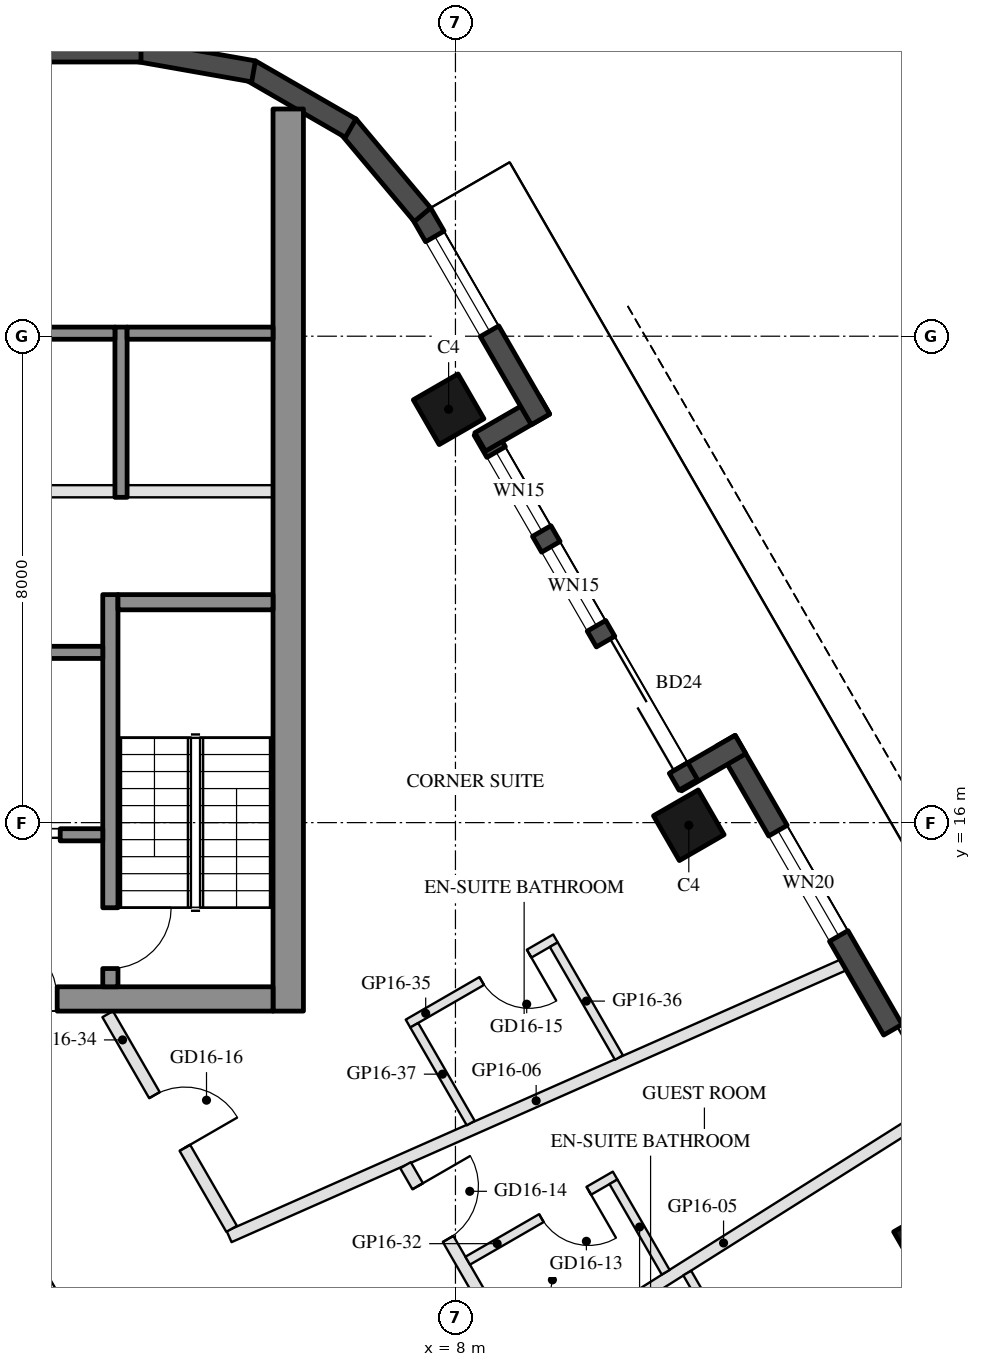
"""IFC4 building model, lengths in metres.
Left out: names, types, materials, properties, quantities, classifications, styles, units other than length and angle.
Written with IfcOpenShell. Run it as: python <this file> out.ifc"""

import sys

from ifc_helpers import new_model, si_unit, direction, frame, frame_2d, origin, origin_2d, place, context, subcontext, project, spatial, rectangle, hollow_rectangle, extrude, element, fill, save


model = new_model("IFC4")
c1 = context("Model", 3, precision=1e-05, world=origin(), true_north=direction((0.0, 1.0)))
c2 = subcontext(c1, "Body", "Model", "MODEL_VIEW")
j1 = project(units=[si_unit("LENGTHUNIT", "METRE"), si_unit("PLANEANGLEUNIT", "RADIAN")], contexts=[c1])
p1 = place(None, origin())
s1 = spatial("IfcSite", under=j1, at=p1, CompositionType="ELEMENT")
p2 = place(p1, origin())
s2 = spatial("IfcBuilding", under=s1, at=p2, CompositionType="ELEMENT")
p3 = place(p2, frame((0.0, 0.0, 179.9)))
s3 = spatial("IfcBuildingStorey", under=s2, at=p3, CompositionType="ELEMENT", Elevation=179.9)
for number, where, z_axis, x_axis in (
    (1, (15.788, 9.115, 0.0), (0.0, 0.0, 1.0), (-0.5, 0.866, 0.0)),
    (2, (11.838, 15.957, 0.0), (0.0, 0.0, 1.0), (-0.5, 0.866, 0.0)),
    (3, (7.888, 22.798, 0.0), (0.0, 0.0, 1.0), (-0.5, 0.866, 0.0)),
):
    element("IfcColumn", number, at=place(p3, frame(where, z_axis=z_axis, x_axis=x_axis)), inside=s3, PredefinedType="COLUMN", context=c2, shape_type="SweptSolid", body=[
        extrude(hollow_rectangle(XDim=0.85, YDim=0.85, WallThickness=0.04, at=origin_2d()), origin(), (0.0, 0.0, 1.0), 3.7),
    ])
p4 = place(p3, frame((17.299, 8.948, 0.0), z_axis=(0.0, 0.0, 1.0), x_axis=(-0.500010041276, 0.866019606374, 0.0)))
e4 = element("IfcWall", 4, at=p4, inside=s3, PredefinedType="SOLIDWALL", context=c2, shape_type="SweptSolid", body=[
    extrude(rectangle(XDim=9.7, YDim=0.35, at=frame_2d((4.85, 0.0))), origin(), (0.0, 0.0, 1.0), 3.55),
])
p5 = place(p4, frame((3.21, 0.0, 0.0)))
e5 = element("IfcOpeningElement", 5, at=p5, cuts=e4, PredefinedType="OPENING", context=c2, shape_type="SweptSolid", body=[
    extrude(rectangle(XDim=1.0, YDim=2.4, at=frame_2d((0.5, 1.2))), frame((0.0, 0.185, 0.0), z_axis=(0.0, -1.0, 0.0), x_axis=(1.0, 0.0, 0.0)), (0.0, 0.0, 1.0), 0.37),
])
p6 = place(p4, frame((5.99, 0.0, 0.3)))
e6 = element("IfcOpeningElement", 6, at=p6, cuts=e4, PredefinedType="OPENING", context=c2, shape_type="SweptSolid", body=[
    extrude(rectangle(XDim=2.0, YDim=2.65, at=frame_2d((1.0, 1.325))), frame((0.0, 0.185, 0.0), z_axis=(0.0, -1.0, 0.0), x_axis=(1.0, 0.0, 0.0)), (0.0, 0.0, 1.0), 0.37),
])
p7 = place(p3, frame((12.688, 17.284, 0.0), z_axis=(0.0, 0.0, 1.0), x_axis=(-0.865955602162, -0.500120880472, 0.0)))
e7 = element("IfcWall", 7, at=p7, inside=s3, PredefinedType="SOLIDWALL", context=c2, shape_type="SweptSolid", body=[
    extrude(rectangle(XDim=1.22, YDim=0.35, at=frame_2d((0.61, 0.0))), origin(), (0.0, 0.0, 1.0), 3.55),
])
p8 = place(p3, frame((11.829, 16.621, 0.0), z_axis=(0.0, 0.0, 1.0), x_axis=(-0.500003597184, 0.866023326939, 0.0)))
e8 = element("IfcWall", 8, at=p8, inside=s3, PredefinedType="SOLIDWALL", context=c2, shape_type="SweptSolid", body=[
    extrude(rectangle(XDim=6.74, YDim=0.35, at=frame_2d((3.37, 0.0))), origin(), (0.0, 0.0, 1.0), 3.55),
])
p9 = place(p8, frame((0.32, 0.0, 0.0)))
e9 = element("IfcOpeningElement", 9, at=p9, cuts=e8, PredefinedType="OPENING", context=c2, shape_type="SweptSolid", body=[
    extrude(rectangle(XDim=2.4, YDim=2.4, at=frame_2d((1.2, 1.2))), frame((0.0, 0.185, 0.0), z_axis=(0.0, -1.0, 0.0), x_axis=(1.0, 0.0, 0.0)), (0.0, 0.0, 1.0), 0.37),
])
p10 = place(p8, frame((3.02, 0.0, 0.3)))
e10 = element("IfcOpeningElement", 10, at=p10, cuts=e8, PredefinedType="OPENING", context=c2, shape_type="SweptSolid", body=[
    extrude(rectangle(XDim=1.5, YDim=2.65, at=frame_2d((0.75, 1.325))), frame((0.0, 0.185, 0.0), z_axis=(0.0, -1.0, 0.0), x_axis=(1.0, 0.0, 0.0)), (0.0, 0.0, 1.0), 0.37),
])
p11 = place(p8, frame((4.82, 0.0, 0.3)))
e11 = element("IfcOpeningElement", 11, at=p11, cuts=e8, PredefinedType="OPENING", context=c2, shape_type="SweptSolid", body=[
    extrude(rectangle(XDim=1.5, YDim=2.65, at=frame_2d((0.75, 1.325))), frame((0.0, 0.185, 0.0), z_axis=(0.0, -1.0, 0.0), x_axis=(1.0, 0.0, 0.0)), (0.0, 0.0, 1.0), 0.37),
])
p12 = place(p3, frame((8.406, 22.26, 0.0), z_axis=(0.0, 0.0, 1.0), x_axis=(0.865955602162, 0.500120880472, 0.0)))
e12 = element("IfcWall", 12, at=p12, inside=s3, PredefinedType="SOLIDWALL", context=c2, shape_type="SweptSolid", body=[
    extrude(rectangle(XDim=1.22, YDim=0.35, at=frame_2d((0.61, 0.0))), origin(), (0.0, 0.0, 1.0), 3.55),
])
p13 = place(p3, frame((9.398, 22.631, 0.0), z_axis=(0.0, 0.0, 1.0), x_axis=(-0.499954521343, 0.866051659307, 0.0)))
e13 = element("IfcWall", 13, at=p13, inside=s3, PredefinedType="SOLIDWALL", context=c2, shape_type="SweptSolid", body=[
    extrude(rectangle(XDim=3.916, YDim=0.35, at=frame_2d((1.958, 0.0))), origin(), (0.0, 0.0, 1.0), 3.55),
])
p14 = place(p13, frame((1.675, 0.0, 0.3)))
e14 = element("IfcOpeningElement", 14, at=p14, cuts=e13, PredefinedType="OPENING", context=c2, shape_type="SweptSolid", body=[
    extrude(rectangle(XDim=1.8, YDim=2.65, at=frame_2d((0.9, 1.325))), frame((0.0, 0.185, 0.0), z_axis=(0.0, -1.0, 0.0), x_axis=(1.0, 0.0, 0.0)), (0.0, 0.0, 1.0), 0.37),
])
p15 = place(p3, frame((7.458, 25.998, 0.0), z_axis=(0.0, 0.0, 1.0), x_axis=(-0.642808304945, 0.766027077259, 0.0)))
e15 = element("IfcWall", 15, at=p15, inside=s3, PredefinedType="SOLIDWALL", context=c2, shape_type="SweptSolid", body=[
    extrude(rectangle(XDim=1.91, YDim=0.35, at=frame_2d((0.955, 0.0))), origin(), (0.0, 0.0, 1.0), 3.55),
])
for number, where, z_axis, x_axis in (
    (16, (6.277, 27.422, 0.0), (0.0, 0.0, 1.0), (-0.866, 0.5, 0.0)),
    (17, (4.68, 28.356, 0.0), (0.0, 0.0, 1.0), (-0.985, 0.174, 0.0)),
):
    element("IfcWall", number, at=place(p3, frame(where, z_axis=z_axis, x_axis=x_axis)), inside=s3, PredefinedType="SOLIDWALL", context=c2, shape_type="SweptSolid", body=[
        extrude(rectangle(XDim=1.91, YDim=0.35, at=frame_2d((0.955, 0.0))), origin(), (0.0, 0.0, 1.0), 3.55),
    ])
p16 = place(p3, frame((2.829, 28.685, 0.0), z_axis=(0.0, 0.0, 1.0), x_axis=(-1.0, 0.0, 0.0)))
e18 = element("IfcWall", 18, at=p16, inside=s3, PredefinedType="SOLIDWALL", context=c2, shape_type="SweptSolid", body=[
    extrude(rectangle(XDim=5.658, YDim=0.35, at=frame_2d((2.829, 0.0))), origin(), (0.0, 0.0, 1.0), 3.55),
])
p17 = place(p3, frame((5.25, 12.9, 0.0), z_axis=(0.0, 0.0, 1.0), x_axis=(0.0, 1.0, 0.0)))
e19 = element("IfcWall", 19, at=p17, inside=s3, PredefinedType="SHEAR", context=c2, shape_type="SweptSolid", body=[
    extrude(rectangle(XDim=14.837, YDim=0.5, at=frame_2d((7.418, 0.0))), origin(), (0.0, 0.0, 1.0), 3.5),
])
p18 = place(p3, frame((5.0, 13.1, 0.0), z_axis=(0.0, 0.0, 1.0), x_axis=(-1.0, 0.0, 0.0)))
e20 = element("IfcWall", 20, at=p18, inside=s3, PredefinedType="SHEAR", context=c2, shape_type="SweptSolid", body=[
    extrude(rectangle(XDim=10.0, YDim=0.4, at=frame_2d((5.0, 0.0))), origin(), (0.0, 0.0, 1.0), 3.5),
])
p19 = place(p18, frame((3.55, 0.0, 0.0)))
e21 = element("IfcOpeningElement", 21, at=p19, cuts=e20, PredefinedType="OPENING", context=c2, shape_type="SweptSolid", body=[
    extrude(rectangle(XDim=1.1, YDim=2.1, at=frame_2d((0.55, 1.05))), frame((0.0, 0.21, 0.0), z_axis=(0.0, -1.0, 0.0), x_axis=(1.0, 0.0, 0.0)), (0.0, 0.0, 1.0), 0.42),
])
p20 = place(p18, frame((5.85, 0.0, 0.0)))
e22 = element("IfcOpeningElement", 22, at=p20, cuts=e20, PredefinedType="OPENING", context=c2, shape_type="SweptSolid", body=[
    extrude(rectangle(XDim=1.4, YDim=2.1, at=frame_2d((0.7, 1.05))), frame((0.0, 0.21, 0.0), z_axis=(0.0, -1.0, 0.0), x_axis=(1.0, 0.0, 0.0)), (0.0, 0.0, 1.0), 0.42),
])
p21 = place(p3, frame((2.325, 13.3, 0.0), z_axis=(0.0, 0.0, 1.0), x_axis=(0.0, 1.0, 0.0)))
e23 = element("IfcWall", 23, at=p21, inside=s3, PredefinedType="SHEAR", context=c2, shape_type="SweptSolid", body=[
    extrude(rectangle(XDim=6.45, YDim=0.25, at=frame_2d((3.225, 0.0))), origin(), (0.0, 0.0, 1.0), 3.5),
])
p22 = place(p21, frame((0.3, 0.0, 0.0)))
e24 = element("IfcOpeningElement", 24, at=p22, cuts=e23, PredefinedType="OPENING", context=c2, shape_type="SweptSolid", body=[
    extrude(rectangle(XDim=1.0, YDim=2.1, at=frame_2d((0.5, 1.05))), frame((0.0, 0.135, 0.0), z_axis=(0.0, -1.0, 0.0), x_axis=(1.0, 0.0, 0.0)), (0.0, 0.0, 1.0), 0.27),
])
p23 = place(p3, frame((5.0, 19.625, 0.0), z_axis=(0.0, 0.0, 1.0), x_axis=(-1.0, 0.0, 0.0)))
e25 = element("IfcWall", 25, at=p23, inside=s3, PredefinedType="SHEAR", context=c2, shape_type="SweptSolid", body=[
    extrude(rectangle(XDim=2.55, YDim=0.25, at=frame_2d((1.275, 0.0))), origin(), (0.0, 0.0, 1.0), 3.5),
])
p24 = place(p3, frame((2.2, 18.8, 0.0), z_axis=(0.0, 0.0, 1.0), x_axis=(-1.0, 0.0, 0.0)))
e26 = element("IfcWall", 26, at=p24, inside=s3, PredefinedType="SHEAR", context=c2, shape_type="SweptSolid", body=[
    extrude(rectangle(XDim=2.8, YDim=0.2, at=frame_2d((1.4, 0.0))), origin(), (0.0, 0.0, 1.0), 3.5),
])
p25 = place(p3, frame((2.2, 15.8, 0.0), z_axis=(0.0, 0.0, 1.0), x_axis=(-1.0, 0.0, 0.0)))
e27 = element("IfcWall", 27, at=p25, inside=s3, PredefinedType="SHEAR", context=c2, shape_type="SweptSolid", body=[
    extrude(rectangle(XDim=2.8, YDim=0.2, at=frame_2d((1.4, 0.0))), origin(), (0.0, 0.0, 1.0), 3.5),
])
p26 = place(p25, frame((0.7, 0.0, 0.0)))
e28 = element("IfcOpeningElement", 28, at=p26, cuts=e27, PredefinedType="OPENING", context=c2, shape_type="SweptSolid", body=[
    extrude(rectangle(XDim=1.2, YDim=2.1, at=frame_2d((0.6, 1.05))), frame((0.0, 0.11, 0.0), z_axis=(0.0, -1.0, 0.0), x_axis=(1.0, 0.0, 0.0)), (0.0, 0.0, 1.0), 0.22),
])
p27 = place(p3, frame((2.5, 21.35, 0.0), z_axis=(0.0, 0.0, 1.0), x_axis=(0.0, 1.0, 0.0)))
e29 = element("IfcWall", 29, at=p27, inside=s3, PredefinedType="SHEAR", context=c2, shape_type="SweptSolid", body=[
    extrude(rectangle(XDim=2.8, YDim=0.2, at=frame_2d((1.4, 0.0))), origin(), (0.0, 0.0, 1.0), 3.5),
])
p28 = place(p3, frame((5.0, 24.05, 0.0), z_axis=(0.0, 0.0, 1.0), x_axis=(-1.0, 0.0, 0.0)))
e30 = element("IfcWall", 30, at=p28, inside=s3, PredefinedType="SHEAR", context=c2, shape_type="SweptSolid", body=[
    extrude(rectangle(XDim=2.4, YDim=0.2, at=frame_2d((1.2, 0.0))), origin(), (0.0, 0.0, 1.0), 3.5),
])
p29 = place(p3, frame((2.4, 24.05, 0.0), z_axis=(0.0, 0.0, 1.0), x_axis=(-1.0, 0.0, 0.0)))
e31 = element("IfcWall", 31, at=p29, inside=s3, PredefinedType="SHEAR", context=c2, shape_type="SweptSolid", body=[
    extrude(rectangle(XDim=2.8, YDim=0.2, at=frame_2d((1.4, 0.0))), origin(), (0.0, 0.0, 1.0), 3.5),
])
p30 = place(p3, frame((5.0, 21.45, 0.0), z_axis=(0.0, 0.0, 1.0), x_axis=(-1.0, 0.0, 0.0)))
e32 = element("IfcWall", 32, at=p30, inside=s3, PredefinedType="PARTITIONING", context=c2, shape_type="SweptSolid", body=[
    extrude(rectangle(XDim=2.4, YDim=0.2, at=frame_2d((1.2, 0.0))), origin(), (0.0, 0.0, 1.0), 3.5),
])
p31 = place(p3, frame((2.4, 21.45, 0.0), z_axis=(0.0, 0.0, 1.0), x_axis=(-1.0, 0.0, 0.0)))
e33 = element("IfcWall", 33, at=p31, inside=s3, PredefinedType="PARTITIONING", context=c2, shape_type="SweptSolid", body=[
    extrude(rectangle(XDim=2.8, YDim=0.2, at=frame_2d((1.4, 0.0))), origin(), (0.0, 0.0, 1.0), 3.5),
])
p32 = place(p3, frame((15.787, 11.216, 0.0), z_axis=(0.0, 0.0, 1.0), x_axis=(-0.845894721315, -0.533349904332, 0.0)))
e34 = element("IfcWall", 34, at=p32, inside=s3, PredefinedType="PARTITIONING", context=c2, shape_type="SweptSolid", body=[
    extrude(rectangle(XDim=7.986, YDim=0.2, at=frame_2d((3.993, 0.0))), origin(), (0.0, 0.0, 1.0), 3.06),
])
p33 = place(p3, frame((14.377, 13.658, 0.0), z_axis=(0.0, 0.0, 1.0), x_axis=(-0.914546661299, -0.404480412762, 0.0)))
e35 = element("IfcWall", 35, at=p33, inside=s3, PredefinedType="PARTITIONING", context=c2, shape_type="SweptSolid", body=[
    extrude(rectangle(XDim=11.043, YDim=0.2, at=frame_2d((5.521, 0.0))), origin(), (0.0, 0.0, 1.0), 3.06),
])
p34 = place(p3, frame((13.296, 6.021, 0.0), z_axis=(0.0, 0.0, 1.0), x_axis=(-0.499978799242, 0.866037643702, 0.0)))
e36 = element("IfcWall", 36, at=p34, inside=s3, PredefinedType="PARTITIONING", context=c2, shape_type="SweptSolid", body=[
    extrude(rectangle(XDim=2.968, YDim=0.15, at=frame_2d((1.484, 0.0))), origin(), (0.0, 0.0, 1.0), 2.95),
])
p35 = place(p3, frame((7.179, 10.365, 0.0), z_axis=(0.0, 0.0, 1.0), x_axis=(0.500021083992, -0.866013230594, 0.0)))
e37 = element("IfcWall", 37, at=p35, inside=s3, PredefinedType="PARTITIONING", context=c2, shape_type="SweptSolid", body=[
    extrude(rectangle(XDim=3.774, YDim=0.2, at=frame_2d((1.887, 0.0))), origin(), (0.0, 0.0, 1.0), 2.95),
])
p36 = place(p35, frame((0.4, 0.0, 0.0)))
e38 = element("IfcOpeningElement", 38, at=p36, cuts=e37, PredefinedType="OPENING", context=c2, shape_type="SweptSolid", body=[
    extrude(rectangle(XDim=1.0, YDim=2.1, at=frame_2d((0.5, 1.05))), frame((0.0, 0.11, 0.0), z_axis=(0.0, -1.0, 0.0), x_axis=(1.0, 0.0, 0.0)), (0.0, 0.0, 1.0), 0.22),
])
p37 = place(p3, frame((10.626, 10.195, 0.0), z_axis=(0.0, 0.0, 1.0), x_axis=(-0.865996816683, -0.500049511043, 0.0)))
e39 = element("IfcWall", 39, at=p37, inside=s3, PredefinedType="PARTITIONING", context=c2, shape_type="SweptSolid", body=[
    extrude(rectangle(XDim=2.8, YDim=0.15, at=frame_2d((1.4, 0.0))), origin(), (0.0, 0.0, 1.0), 3.55),
])
p38 = place(p37, frame((0.5, 0.0, 0.0)))
e40 = element("IfcOpeningElement", 40, at=p38, cuts=e39, PredefinedType="OPENING", context=c2, shape_type="SweptSolid", body=[
    extrude(rectangle(XDim=0.9, YDim=2.1, at=frame_2d((0.45, 1.05))), frame((0.0, 0.085, 0.0), z_axis=(0.0, -1.0, 0.0), x_axis=(1.0, 0.0, 0.0)), (0.0, 0.0, 1.0), 0.17),
])
p39 = place(p3, frame((11.458, 8.605, 0.0), z_axis=(0.0, 0.0, 1.0), x_axis=(-0.499898763811, 0.866083844636, 0.0)))
e41 = element("IfcWall", 41, at=p39, inside=s3, PredefinedType="PARTITIONING", context=c2, shape_type="SweptSolid", body=[
    extrude(rectangle(XDim=1.718, YDim=0.15, at=frame_2d((0.859, 0.0))), origin(), (0.0, 0.0, 1.0), 3.55),
])
p40 = place(p3, frame((2.281, 12.85, 0.0), z_axis=(0.0, 0.0, 1.0), x_axis=(0.499971273698, -0.866041988288, 0.0)))
e42 = element("IfcWall", 42, at=p40, inside=s3, PredefinedType="PARTITIONING", context=c2, shape_type="SweptSolid", body=[
    extrude(rectangle(XDim=4.077, YDim=0.2, at=frame_2d((2.039, 0.0))), origin(), (0.0, 0.0, 1.0), 2.95),
])
p41 = place(p40, frame((1.538, 0.0, 0.0)))
e43 = element("IfcOpeningElement", 43, at=p41, cuts=e42, PredefinedType="OPENING", context=c2, shape_type="SweptSolid", body=[
    extrude(rectangle(XDim=1.0, YDim=2.1, at=frame_2d((0.5, 1.05))), frame((0.0, 0.11, 0.0), z_axis=(0.0, -1.0, 0.0), x_axis=(1.0, 0.0, 0.0)), (0.0, 0.0, 1.0), 0.22),
])
p42 = place(p3, frame((9.645, 14.095, 0.0), z_axis=(0.0, 0.0, 1.0), x_axis=(-0.865996816683, -0.500049511043, 0.0)))
e44 = element("IfcWall", 44, at=p42, inside=s3, PredefinedType="PARTITIONING", context=c2, shape_type="SweptSolid", body=[
    extrude(rectangle(XDim=2.8, YDim=0.15, at=frame_2d((1.4, 0.0))), origin(), (0.0, 0.0, 1.0), 3.55),
])
p43 = place(p42, frame((0.5, 0.0, 0.0)))
e45 = element("IfcOpeningElement", 45, at=p43, cuts=e44, PredefinedType="OPENING", context=c2, shape_type="SweptSolid", body=[
    extrude(rectangle(XDim=0.9, YDim=2.1, at=frame_2d((0.45, 1.05))), frame((0.0, 0.085, 0.0), z_axis=(0.0, -1.0, 0.0), x_axis=(1.0, 0.0, 0.0)), (0.0, 0.0, 1.0), 0.17),
])
p44 = place(p3, frame((10.689, 12.136, 0.0), z_axis=(0.0, 0.0, 1.0), x_axis=(-0.499949244157, 0.866054705701, 0.0)))
e46 = element("IfcWall", 46, at=p44, inside=s3, PredefinedType="PARTITIONING", context=c2, shape_type="SweptSolid", body=[
    extrude(rectangle(XDim=2.143, YDim=0.15, at=frame_2d((1.072, 0.0))), origin(), (0.0, 0.0, 1.0), 3.55),
])
p45 = place(p3, frame((8.251, 11.059, 0.0), z_axis=(0.0, 0.0, 1.0), x_axis=(-0.500025795397, 0.866010510293, 0.0)))
e47 = element("IfcWall", 47, at=p45, inside=s3, PredefinedType="PARTITIONING", context=c2, shape_type="SweptSolid", body=[
    extrude(rectangle(XDim=1.858, YDim=0.15, at=frame_2d((0.929, 0.0))), origin(), (0.0, 0.0, 1.0), 3.55),
])
p46 = place(p5, frame((1.0, 0.0, 0.0), z_axis=(0.0, 0.0, 1.0), x_axis=(-1.0, 0.0, 0.0)))
e48 = element("IfcDoor", 48, at=p46, inside=s3, OperationType="SLIDING_TO_LEFT", PredefinedType="DOOR", context=c2, shape_type="SweptSolid", body=[
    extrude(rectangle(XDim=1.0, YDim=2.4, at=frame_2d((0.5, 1.2))), frame((0.0, 0.025, 0.0), z_axis=(0.0, -1.0, 0.0), x_axis=(1.0, 0.0, 0.0)), (0.0, 0.0, 1.0), 0.05),
])
fill(e5, e48)
p47 = place(p6, origin())
e49 = element("IfcWindow", 49, at=p47, inside=s3, PartitioningType="SINGLE_PANEL", PredefinedType="WINDOW", context=c2, shape_type="SweptSolid", body=[
    extrude(rectangle(XDim=2.0, YDim=2.65, at=frame_2d((1.0, 1.325))), frame((0.0, 0.03, 0.0), z_axis=(0.0, -1.0, 0.0), x_axis=(1.0, 0.0, 0.0)), (0.0, 0.0, 1.0), 0.06),
])
fill(e6, e49)
p48 = place(p9, frame((2.4, 0.0, 0.0), z_axis=(0.0, 0.0, 1.0), x_axis=(-1.0, 0.0, 0.0)))
e50 = element("IfcDoor", 50, at=p48, inside=s3, OperationType="SLIDING_TO_LEFT", PredefinedType="DOOR", context=c2, shape_type="SweptSolid", body=[
    extrude(rectangle(XDim=2.4, YDim=2.4, at=frame_2d((1.2, 1.2))), frame((0.0, 0.025, 0.0), z_axis=(0.0, -1.0, 0.0), x_axis=(1.0, 0.0, 0.0)), (0.0, 0.0, 1.0), 0.05),
])
fill(e9, e50)
p49 = place(p10, origin())
e51 = element("IfcWindow", 51, at=p49, inside=s3, PartitioningType="SINGLE_PANEL", PredefinedType="WINDOW", context=c2, shape_type="SweptSolid", body=[
    extrude(rectangle(XDim=1.5, YDim=2.65, at=frame_2d((0.75, 1.325))), frame((0.0, 0.03, 0.0), z_axis=(0.0, -1.0, 0.0), x_axis=(1.0, 0.0, 0.0)), (0.0, 0.0, 1.0), 0.06),
])
fill(e10, e51)
p50 = place(p11, origin())
e52 = element("IfcWindow", 52, at=p50, inside=s3, PartitioningType="SINGLE_PANEL", PredefinedType="WINDOW", context=c2, shape_type="SweptSolid", body=[
    extrude(rectangle(XDim=1.5, YDim=2.65, at=frame_2d((0.75, 1.325))), frame((0.0, 0.03, 0.0), z_axis=(0.0, -1.0, 0.0), x_axis=(1.0, 0.0, 0.0)), (0.0, 0.0, 1.0), 0.06),
])
fill(e11, e52)
p51 = place(p14, origin())
e53 = element("IfcWindow", 53, at=p51, inside=s3, PartitioningType="SINGLE_PANEL", PredefinedType="WINDOW", context=c2, shape_type="SweptSolid", body=[
    extrude(rectangle(XDim=1.8, YDim=2.65, at=frame_2d((0.9, 1.325))), frame((0.0, 0.03, 0.0), z_axis=(0.0, -1.0, 0.0), x_axis=(1.0, 0.0, 0.0)), (0.0, 0.0, 1.0), 0.06),
])
fill(e14, e53)
p52 = place(p26, origin())
e54 = element("IfcDoor", 54, at=p52, inside=s3, OperationType="DOUBLE_DOOR_SLIDING", PredefinedType="DOOR", context=c2, shape_type="SweptSolid", body=[
    extrude(rectangle(XDim=1.2, YDim=2.1, at=frame_2d((0.6, 1.05))), frame((0.0, 0.025, 0.0), z_axis=(0.0, -1.0, 0.0), x_axis=(1.0, 0.0, 0.0)), (0.0, 0.0, 1.0), 0.05),
])
fill(e28, e54)
p53 = place(p19, frame((1.1, 0.0, 0.0), z_axis=(0.0, 0.0, 1.0), x_axis=(-1.0, 0.0, 0.0)))
e55 = element("IfcDoor", 55, at=p53, inside=s3, OperationType="SINGLE_SWING_LEFT", PredefinedType="DOOR", context=c2, shape_type="SweptSolid", body=[
    extrude(rectangle(XDim=1.1, YDim=2.1, at=frame_2d((0.55, 1.05))), frame((0.0, 0.025, 0.0), z_axis=(0.0, -1.0, 0.0), x_axis=(1.0, 0.0, 0.0)), (0.0, 0.0, 1.0), 0.05),
])
fill(e21, e55)
p54 = place(p22, frame((1.0, 0.0, 0.0), z_axis=(0.0, 0.0, 1.0), x_axis=(-1.0, 0.0, 0.0)))
e56 = element("IfcDoor", 56, at=p54, inside=s3, OperationType="SINGLE_SWING_LEFT", PredefinedType="DOOR", context=c2, shape_type="SweptSolid", body=[
    extrude(rectangle(XDim=1.0, YDim=2.1, at=frame_2d((0.5, 1.05))), frame((0.0, 0.025, 0.0), z_axis=(0.0, -1.0, 0.0), x_axis=(1.0, 0.0, 0.0)), (0.0, 0.0, 1.0), 0.05),
])
fill(e24, e56)
p55 = place(p38, origin())
e57 = element("IfcDoor", 57, at=p55, inside=s3, OperationType="SINGLE_SWING_LEFT", PredefinedType="DOOR", context=c2, shape_type="SweptSolid", body=[
    extrude(rectangle(XDim=0.9, YDim=2.1, at=frame_2d((0.45, 1.05))), frame((0.0, 0.025, 0.0), z_axis=(0.0, -1.0, 0.0), x_axis=(1.0, 0.0, 0.0)), (0.0, 0.0, 1.0), 0.05),
])
fill(e40, e57)
p56 = place(p36, origin())
e58 = element("IfcDoor", 58, at=p56, inside=s3, OperationType="SINGLE_SWING_LEFT", PredefinedType="DOOR", context=c2, shape_type="SweptSolid", body=[
    extrude(rectangle(XDim=1.0, YDim=2.1, at=frame_2d((0.5, 1.05))), frame((0.0, 0.025, 0.0), z_axis=(0.0, -1.0, 0.0), x_axis=(1.0, 0.0, 0.0)), (0.0, 0.0, 1.0), 0.05),
])
fill(e38, e58)
p57 = place(p43, origin())
e59 = element("IfcDoor", 59, at=p57, inside=s3, OperationType="SINGLE_SWING_LEFT", PredefinedType="DOOR", context=c2, shape_type="SweptSolid", body=[
    extrude(rectangle(XDim=0.9, YDim=2.1, at=frame_2d((0.45, 1.05))), frame((0.0, 0.025, 0.0), z_axis=(0.0, -1.0, 0.0), x_axis=(1.0, 0.0, 0.0)), (0.0, 0.0, 1.0), 0.05),
])
fill(e45, e59)
p58 = place(p41, origin())
e60 = element("IfcDoor", 60, at=p58, inside=s3, OperationType="SINGLE_SWING_RIGHT", PredefinedType="DOOR", context=c2, shape_type="SweptSolid", body=[
    extrude(rectangle(XDim=1.0, YDim=2.1, at=frame_2d((0.5, 1.05))), frame((0.0, 0.025, 0.0), z_axis=(0.0, -1.0, 0.0), x_axis=(1.0, 0.0, 0.0)), (0.0, 0.0, 1.0), 0.05),
])
fill(e43, e60)
save(model, sys.argv[1])
